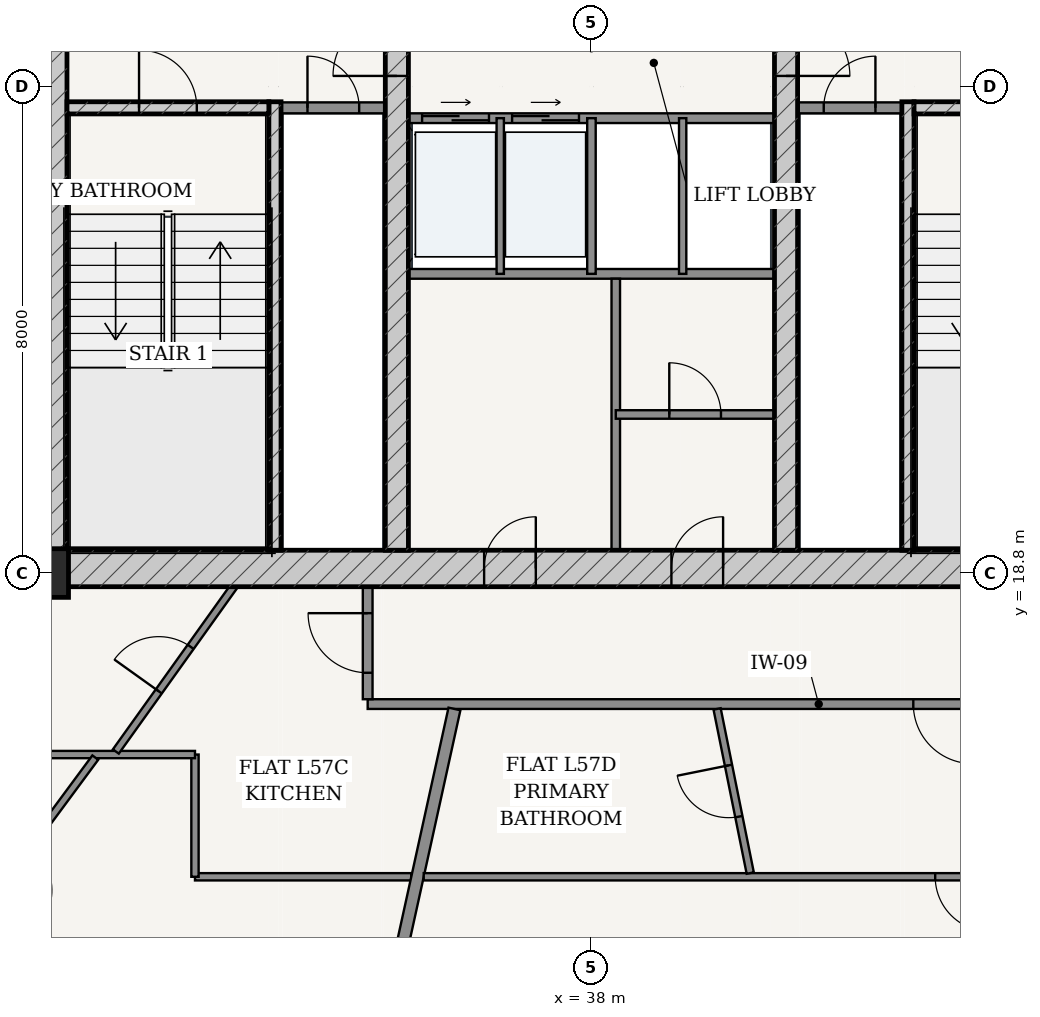
"""IFC4 building model, lengths in metres.
Left out: names, types, materials, properties, quantities, classifications, styles, units other than length and angle.
Written with IfcOpenShell. Run it as: python <this file> out.ifc"""

import sys

from ifc_helpers import new_model, si_unit, direction, frame, frame_2d, origin, origin_2d, place, context, subcontext, project, spatial, rectangle, extrude, source, transform, mapped, element, fill, save


model = new_model("IFC4")
c1 = context("Model", 3, precision=1e-05, world=origin(), true_north=direction((-0.2419218956, 0.970295726276)))
c2 = subcontext(c1, "Body", "Model", "MODEL_VIEW")
j1 = project(units=[si_unit("LENGTHUNIT", "METRE"), si_unit("PLANEANGLEUNIT", "RADIAN")], contexts=[c1])
p1 = place(None, origin())
s1 = spatial("IfcSite", under=j1, at=p1, CompositionType="ELEMENT")
p2 = place(p1, origin())
s2 = spatial("IfcBuilding", under=s1, at=p2, CompositionType="ELEMENT")
p3 = place(p2, frame((0.0, 0.0, 217.1)))
s3 = spatial("IfcBuildingStorey", under=s2, at=p3, CompositionType="ELEMENT", Elevation=217.1)
p4 = place(p3, frame((29.0, 18.8, 0.0), z_axis=(0.0, 0.0, 1.0), x_axis=(1.0, 0.0, 0.0)))
e1 = element("IfcColumn", 1, at=p4, inside=s3, PredefinedType="COLUMN", context=c2, shape_type="SweptSolid", body=[
    extrude(rectangle(XDim=0.8, YDim=0.8, at=origin_2d()), origin(), (0.0, 0.0, 1.0), 3.7),
])
p5 = place(p3, frame((28.775, 18.875, 0.0), z_axis=(0.0, 0.0, 1.0), x_axis=(1.0, 0.0, 0.0)))
e2 = element("IfcWall", 2, at=p5, inside=s3, PredefinedType="SHEAR", context=c2, shape_type="SweptSolid", body=[
    extrude(rectangle(XDim=18.45, YDim=0.6, at=frame_2d((9.225, 0.0))), origin(), (0.0, 0.0, 1.0), 3.435),
])
p6 = place(p5, frame((7.46, 0.0, 0.0)))
e3 = element("IfcOpeningElement", 3, at=p6, cuts=e2, PredefinedType="OPENING", context=c2, shape_type="SweptSolid", body=[
    extrude(rectangle(XDim=0.85, YDim=2.1, at=frame_2d((0.425, 1.05))), frame((0.0, 0.31, 0.0), z_axis=(0.0, -1.0, 0.0), x_axis=(1.0, 0.0, 0.0)), (0.0, 0.0, 1.0), 0.62),
])
p7 = place(p5, frame((10.54, 0.0, 0.0)))
e4 = element("IfcOpeningElement", 4, at=p7, cuts=e2, PredefinedType="OPENING", context=c2, shape_type="SweptSolid", body=[
    extrude(rectangle(XDim=0.85, YDim=2.1, at=frame_2d((0.425, 1.05))), frame((0.0, 0.31, 0.0), z_axis=(0.0, -1.0, 0.0), x_axis=(1.0, 0.0, 0.0)), (0.0, 0.0, 1.0), 0.62),
])
p8 = place(p3, frame((29.075, 19.175, 0.0), z_axis=(0.0, 0.0, 1.0), x_axis=(0.0, 1.0, 0.0)))
e5 = element("IfcWall", 5, at=p8, inside=s3, PredefinedType="SHEAR", context=c2, shape_type="SweptSolid", body=[
    extrude(rectangle(XDim=15.25, YDim=0.6, at=frame_2d((7.625, 0.0))), origin(), (0.0, 0.0, 1.0), 3.435),
])
p9 = place(p8, frame((9.875, 0.0, 0.0)))
e6 = element("IfcOpeningElement", 6, at=p9, cuts=e5, PredefinedType="OPENING", context=c2, shape_type="SweptSolid", body=[
    extrude(rectangle(XDim=1.5, YDim=2.2, at=frame_2d((0.75, 1.1))), frame((0.0, 0.31, 0.0), z_axis=(0.0, -1.0, 0.0), x_axis=(1.0, 0.0, 0.0)), (0.0, 0.0, 1.0), 0.62),
])
p10 = place(p3, frame((32.795, 19.175, 0.0), z_axis=(0.0, 0.0, 1.0), x_axis=(0.0, 1.0, 0.0)))
e7 = element("IfcWall", 7, at=p10, inside=s3, PredefinedType="SOLIDWALL", context=c2, shape_type="SweptSolid", body=[
    extrude(rectangle(XDim=7.375, YDim=0.2, at=frame_2d((3.688, 0.0))), origin(), (0.0, 0.0, 1.0), 3.435),
])
p11 = place(p3, frame((29.375, 26.45, 0.0), z_axis=(0.0, 0.0, 1.0), x_axis=(1.0, 0.0, 0.0)))
e8 = element("IfcWall", 8, at=p11, inside=s3, PredefinedType="SOLIDWALL", context=c2, shape_type="SweptSolid", body=[
    extrude(rectangle(XDim=3.32, YDim=0.2, at=frame_2d((1.66, 0.0))), origin(), (0.0, 0.0, 1.0), 3.435),
])
p12 = place(p11, frame((1.185, 0.0, 0.0)))
e9 = element("IfcOpeningElement", 9, at=p12, cuts=e8, PredefinedType="OPENING", context=c2, shape_type="SweptSolid", body=[
    extrude(rectangle(XDim=0.95, YDim=2.15, at=frame_2d((0.475, 1.075))), frame((0.0, 0.11, 0.0), z_axis=(0.0, -1.0, 0.0), x_axis=(1.0, 0.0, 0.0)), (0.0, 0.0, 1.0), 0.22),
])
p13 = place(p3, frame((43.205, 19.175, 0.0), z_axis=(0.0, 0.0, 1.0), x_axis=(0.0, 1.0, 0.0)))
e10 = element("IfcWall", 10, at=p13, inside=s3, PredefinedType="SOLIDWALL", context=c2, shape_type="SweptSolid", body=[
    extrude(rectangle(XDim=7.375, YDim=0.2, at=frame_2d((3.688, 0.0))), origin(), (0.0, 0.0, 1.0), 3.435),
])
p14 = place(p3, frame((43.305, 26.45, 0.0), z_axis=(0.0, 0.0, 1.0), x_axis=(1.0, 0.0, 0.0)))
e11 = element("IfcWall", 11, at=p14, inside=s3, PredefinedType="SOLIDWALL", context=c2, shape_type="SweptSolid", body=[
    extrude(rectangle(XDim=3.32, YDim=0.2, at=frame_2d((1.66, 0.0))), origin(), (0.0, 0.0, 1.0), 3.435),
])
p15 = place(p14, frame((1.185, 0.0, 0.0)))
e12 = element("IfcOpeningElement", 12, at=p15, cuts=e11, PredefinedType="OPENING", context=c2, shape_type="SweptSolid", body=[
    extrude(rectangle(XDim=0.95, YDim=2.15, at=frame_2d((0.475, 1.075))), frame((0.0, 0.11, 0.0), z_axis=(0.0, -1.0, 0.0), x_axis=(1.0, 0.0, 0.0)), (0.0, 0.0, 1.0), 0.22),
])
p16 = place(p3, frame((34.8, 19.175, 0.0), z_axis=(0.0, 0.0, 1.0), x_axis=(0.0, 1.0, 0.0)))
e13 = element("IfcWall", 13, at=p16, inside=s3, PredefinedType="SHEAR", context=c2, shape_type="SweptSolid", body=[
    extrude(rectangle(XDim=15.25, YDim=0.38, at=frame_2d((7.625, 0.0))), origin(), (0.0, 0.0, 1.0), 3.435),
])
p17 = place(p16, frame((7.8, 0.0, 0.0)))
e14 = element("IfcOpeningElement", 14, at=p17, cuts=e13, PredefinedType="OPENING", context=c2, shape_type="SweptSolid", body=[
    extrude(rectangle(XDim=1.05, YDim=2.15, at=frame_2d((0.525, 1.075))), frame((0.0, 0.2, 0.0), z_axis=(0.0, -1.0, 0.0), x_axis=(1.0, 0.0, 0.0)), (0.0, 0.0, 1.0), 0.4),
])
p18 = place(p3, frame((41.2, 19.175, 0.0), z_axis=(0.0, 0.0, 1.0), x_axis=(0.0, 1.0, 0.0)))
e15 = element("IfcWall", 15, at=p18, inside=s3, PredefinedType="SHEAR", context=c2, shape_type="SweptSolid", body=[
    extrude(rectangle(XDim=15.25, YDim=0.38, at=frame_2d((7.625, 0.0))), origin(), (0.0, 0.0, 1.0), 3.435),
])
p19 = place(p18, frame((7.8, 0.0, 0.0)))
e16 = element("IfcOpeningElement", 16, at=p19, cuts=e15, PredefinedType="OPENING", context=c2, shape_type="SweptSolid", body=[
    extrude(rectangle(XDim=1.05, YDim=2.15, at=frame_2d((0.525, 1.075))), frame((0.0, 0.2, 0.0), z_axis=(0.0, -1.0, 0.0), x_axis=(1.0, 0.0, 0.0)), (0.0, 0.0, 1.0), 0.4),
])
p20 = place(p3, frame((32.9, 26.45, 0.0), z_axis=(0.0, 0.0, 1.0), x_axis=(1.0, 0.0, 0.0)))
e17 = element("IfcWall", 17, at=p20, inside=s3, PredefinedType="PARTITIONING", context=c2, shape_type="SweptSolid", body=[
    extrude(rectangle(XDim=1.71, YDim=0.18, at=frame_2d((0.855, 0.0))), origin(), (0.0, 0.0, 1.0), 3.435),
])
p21 = place(p20, frame((0.43, 0.0, 0.0)))
e18 = element("IfcOpeningElement", 18, at=p21, cuts=e17, PredefinedType="OPENING", context=c2, shape_type="SweptSolid", body=[
    extrude(rectangle(XDim=0.85, YDim=2.1, at=frame_2d((0.425, 1.05))), frame((0.0, 0.1, 0.0), z_axis=(0.0, -1.0, 0.0), x_axis=(1.0, 0.0, 0.0)), (0.0, 0.0, 1.0), 0.2),
])
p22 = place(p3, frame((41.39, 26.45, 0.0), z_axis=(0.0, 0.0, 1.0), x_axis=(1.0, 0.0, 0.0)))
e19 = element("IfcWall", 19, at=p22, inside=s3, PredefinedType="PARTITIONING", context=c2, shape_type="SweptSolid", body=[
    extrude(rectangle(XDim=1.71, YDim=0.18, at=frame_2d((0.855, 0.0))), origin(), (0.0, 0.0, 1.0), 3.435),
])
p23 = place(p22, frame((0.43, 0.0, 0.0)))
e20 = element("IfcOpeningElement", 20, at=p23, cuts=e19, PredefinedType="OPENING", context=c2, shape_type="SweptSolid", body=[
    extrude(rectangle(XDim=0.85, YDim=2.1, at=frame_2d((0.425, 1.05))), frame((0.0, 0.1, 0.0), z_axis=(0.0, -1.0, 0.0), x_axis=(1.0, 0.0, 0.0)), (0.0, 0.0, 1.0), 0.2),
])
p24 = place(p3, frame((34.99, 26.28, 0.0), z_axis=(0.0, 0.0, 1.0), x_axis=(1.0, 0.0, 0.0)))
e21 = element("IfcWall", 21, at=p24, inside=s3, PredefinedType="PARTITIONING", context=c2, shape_type="SweptSolid", body=[
    extrude(rectangle(XDim=6.02, YDim=0.16, at=frame_2d((3.01, 0.0))), origin(), (0.0, 0.0, 1.0), 3.435),
])
p25 = place(p24, frame((0.225, 0.0, 0.0)))
e22 = element("IfcOpeningElement", 22, at=p25, cuts=e21, PredefinedType="OPENING", context=c2, shape_type="SweptSolid", body=[
    extrude(rectangle(XDim=1.1, YDim=2.2, at=frame_2d((0.55, 1.1))), frame((0.0, 0.09, 0.0), z_axis=(0.0, -1.0, 0.0), x_axis=(1.0, 0.0, 0.0)), (0.0, 0.0, 1.0), 0.18),
])
p26 = place(p24, frame((1.705, 0.0, 0.0)))
e23 = element("IfcOpeningElement", 23, at=p26, cuts=e21, PredefinedType="OPENING", context=c2, shape_type="SweptSolid", body=[
    extrude(rectangle(XDim=1.1, YDim=2.2, at=frame_2d((0.55, 1.1))), frame((0.0, 0.09, 0.0), z_axis=(0.0, -1.0, 0.0), x_axis=(1.0, 0.0, 0.0)), (0.0, 0.0, 1.0), 0.18),
])
p27 = place(p3, frame((34.99, 23.72, 0.0), z_axis=(0.0, 0.0, 1.0), x_axis=(1.0, 0.0, 0.0)))
e24 = element("IfcWall", 24, at=p27, inside=s3, PredefinedType="PARTITIONING", context=c2, shape_type="SweptSolid", body=[
    extrude(rectangle(XDim=6.02, YDim=0.16, at=frame_2d((3.01, 0.0))), origin(), (0.0, 0.0, 1.0), 3.435),
])
p28 = place(p3, frame((36.5, 23.72, 0.0), z_axis=(0.0, 0.0, 1.0), x_axis=(0.0, 1.0, 0.0)))
e25 = element("IfcWall", 25, at=p28, inside=s3, PredefinedType="PARTITIONING", context=c2, shape_type="SweptSolid", body=[
    extrude(rectangle(XDim=2.56, YDim=0.12, at=frame_2d((1.28, 0.0))), origin(), (0.0, 0.0, 1.0), 3.435),
])
p29 = place(p3, frame((38.0, 23.72, 0.0), z_axis=(0.0, 0.0, 1.0), x_axis=(0.0, 1.0, 0.0)))
e26 = element("IfcWall", 26, at=p29, inside=s3, PredefinedType="PARTITIONING", context=c2, shape_type="SweptSolid", body=[
    extrude(rectangle(XDim=2.56, YDim=0.14, at=frame_2d((1.28, 0.0))), origin(), (0.0, 0.0, 1.0), 3.435),
])
p30 = place(p3, frame((39.5, 23.72, 0.0), z_axis=(0.0, 0.0, 1.0), x_axis=(0.0, 1.0, 0.0)))
e27 = element("IfcWall", 27, at=p30, inside=s3, PredefinedType="PARTITIONING", context=c2, shape_type="SweptSolid", body=[
    extrude(rectangle(XDim=2.56, YDim=0.12, at=frame_2d((1.28, 0.0))), origin(), (0.0, 0.0, 1.0), 3.435),
])
p31 = place(p3, frame((38.4, 19.175, 0.0), z_axis=(0.0, 0.0, 1.0), x_axis=(0.0, 1.0, 0.0)))
e28 = element("IfcWall", 28, at=p31, inside=s3, PredefinedType="PARTITIONING", context=c2, shape_type="SweptSolid", body=[
    extrude(rectangle(XDim=4.465, YDim=0.14, at=frame_2d((2.232, 0.0))), origin(), (0.0, 0.0, 1.0), 3.435),
])
p32 = place(p3, frame((38.4, 21.407, 0.0), z_axis=(0.0, 0.0, 1.0), x_axis=(1.0, 0.0, 0.0)))
e29 = element("IfcWall", 29, at=p32, inside=s3, PredefinedType="PARTITIONING", context=c2, shape_type="SweptSolid", body=[
    extrude(rectangle(XDim=2.61, YDim=0.14, at=frame_2d((1.305, 0.0))), origin(), (0.0, 0.0, 1.0), 3.435),
])
p33 = place(p32, frame((0.88, 0.0, 0.0)))
e30 = element("IfcOpeningElement", 30, at=p33, cuts=e29, PredefinedType="OPENING", context=c2, shape_type="SweptSolid", body=[
    extrude(rectangle(XDim=0.85, YDim=2.1, at=frame_2d((0.425, 1.05))), frame((0.0, 0.08, 0.0), z_axis=(0.0, -1.0, 0.0), x_axis=(1.0, 0.0, 0.0)), (0.0, 0.0, 1.0), 0.16),
])
p34 = place(p3, frame((34.32, 16.645, 0.0), z_axis=(0.0, 0.0, 1.0), x_axis=(1.0, 0.0, 0.0)))
e31 = element("IfcWall", 31, at=p34, inside=s3, PredefinedType="PARTITIONING", context=c2, shape_type="SweptSolid", body=[
    extrude(rectangle(XDim=14.835, YDim=0.16, at=frame_2d((7.417, 0.0))), origin(), (0.0, 0.0, 1.0), 2.951),
])
p35 = place(p34, frame((8.973, 0.0, 0.0)))
e32 = element("IfcOpeningElement", 32, at=p35, cuts=e31, PredefinedType="OPENING", context=c2, shape_type="SweptSolid", body=[
    extrude(rectangle(XDim=0.98, YDim=2.2, at=frame_2d((0.49, 1.1))), frame((0.0, 0.09, 0.0), z_axis=(0.0, -1.0, 0.0), x_axis=(1.0, 0.0, 0.0)), (0.0, 0.0, 1.0), 0.18),
])
p36 = place(p3, frame((34.32, 16.725, 0.0), z_axis=(0.0, 0.0, 1.0), x_axis=(0.0, 1.0, 0.0)))
e33 = element("IfcWall", 33, at=p36, inside=s3, PredefinedType="PARTITIONING", context=c2, shape_type="SweptSolid", body=[
    extrude(rectangle(XDim=1.85, YDim=0.16, at=frame_2d((0.925, 0.0))), origin(), (0.0, 0.0, 1.0), 3.435),
])
p37 = place(p36, frame((0.435, 0.0, 0.0)))
e34 = element("IfcOpeningElement", 34, at=p37, cuts=e33, PredefinedType="OPENING", context=c2, shape_type="SweptSolid", body=[
    extrude(rectangle(XDim=0.98, YDim=2.2, at=frame_2d((0.49, 1.1))), frame((0.0, 0.09, 0.0), z_axis=(0.0, -1.0, 0.0), x_axis=(1.0, 0.0, 0.0)), (0.0, 0.0, 1.0), 0.18),
])
p38 = place(p3, frame((35.038, 13.805, 0.0), z_axis=(0.0, 0.0, 1.0), x_axis=(-1.0, 0.0, 0.0)))
e35 = element("IfcWall", 35, at=p38, inside=s3, PredefinedType="PARTITIONING", context=c2, shape_type="SweptSolid", body=[
    extrude(rectangle(XDim=3.558, YDim=0.12, at=frame_2d((1.779, 0.0))), origin(), (0.0, 0.0, 1.0), 2.951),
])
p39 = place(p3, frame((31.48, 13.805, 0.0), z_axis=(0.0, 0.0, 1.0), x_axis=(0.0, 1.0, 0.0)))
e36 = element("IfcWall", 36, at=p39, inside=s3, PredefinedType="PARTITIONING", context=c2, shape_type="SweptSolid", body=[
    extrude(rectangle(XDim=2.01, YDim=0.12, at=frame_2d((1.005, 0.0))), origin(), (0.0, 0.0, 1.0), 3.11),
])
p40 = place(p3, frame((31.48, 15.815, 0.0), z_axis=(0.0, 0.0, 1.0), x_axis=(-1.0, 0.0, 0.0)))
e37 = element("IfcWall", 37, at=p40, inside=s3, PredefinedType="PARTITIONING", context=c2, shape_type="SweptSolid", body=[
    extrude(rectangle(XDim=5.465, YDim=0.12, at=frame_2d((2.732, 0.0))), origin(), (0.0, 0.0, 1.0), 2.951),
])
p41 = place(p3, frame((29.841, 15.765, 0.0), z_axis=(0.0, 0.0, 1.0), x_axis=(-0.594535821787, -0.804069124275, 0.0)))
e38 = element("IfcWall", 38, at=p41, inside=s3, PredefinedType="PARTITIONING", context=c2, shape_type="SweptSolid", body=[
    extrude(rectangle(XDim=6.543, YDim=0.12, at=frame_2d((3.272, 0.0))), origin(), (0.0, 0.0, 1.0), 2.951),
])
p42 = place(p41, frame((1.814, 0.0, 0.0)))
e39 = element("IfcOpeningElement", 39, at=p42, cuts=e38, PredefinedType="OPENING", context=c2, shape_type="SweptSolid", body=[
    extrude(rectangle(XDim=0.9, YDim=2.15, at=frame_2d((0.45, 1.075))), frame((0.0, 0.07, 0.0), z_axis=(0.0, -1.0, 0.0), x_axis=(1.0, 0.0, 0.0)), (0.0, 0.0, 1.0), 0.14),
])
p43 = place(p3, frame((32.117, 18.575, 0.0), z_axis=(0.0, 0.0, 1.0), x_axis=(-0.581813438478, -0.813322274874, 0.0)))
e40 = element("IfcWall", 40, at=p43, inside=s3, PredefinedType="PARTITIONING", context=c2, shape_type="SweptSolid", body=[
    extrude(rectangle(XDim=3.331, YDim=0.12, at=frame_2d((1.666, 0.0))), origin(), (0.0, 0.0, 1.0), 3.435),
])
p44 = place(p43, frame((1.216, 0.0, 0.0)))
e41 = element("IfcOpeningElement", 41, at=p44, cuts=e40, PredefinedType="OPENING", context=c2, shape_type="SweptSolid", body=[
    extrude(rectangle(XDim=0.9, YDim=2.15, at=frame_2d((0.45, 1.075))), frame((0.0, 0.07, 0.0), z_axis=(0.0, -1.0, 0.0), x_axis=(1.0, 0.0, 0.0)), (0.0, 0.0, 1.0), 0.14),
])
p45 = place(p3, frame((35.747, 16.565, 0.0), z_axis=(0.0, 0.0, 1.0), x_axis=(-0.214957946814, -0.976623305631, 0.0)))
e42 = element("IfcWall", 42, at=p45, inside=s3, PredefinedType="PARTITIONING", context=c2, shape_type="SweptSolid", body=[
    extrude(rectangle(XDim=9.202, YDim=0.2, at=frame_2d((4.601, 0.0))), origin(), (0.0, 0.0, 1.0), 2.951),
])
p46 = place(p3, frame((51.995, 13.805, 0.0), z_axis=(0.0, 0.0, 1.0), x_axis=(-1.0, 0.0, 0.0)))
e43 = element("IfcWall", 43, at=p46, inside=s3, PredefinedType="PARTITIONING", context=c2, shape_type="SweptSolid", body=[
    extrude(rectangle(XDim=16.753, YDim=0.12, at=frame_2d((8.377, 0.0))), origin(), (0.0, 0.0, 1.0), 2.951),
])
p47 = place(p46, frame((7.442, 0.0, 0.0)))
e44 = element("IfcOpeningElement", 44, at=p47, cuts=e43, PredefinedType="OPENING", context=c2, shape_type="SweptSolid", body=[
    extrude(rectangle(XDim=0.9, YDim=2.15, at=frame_2d((0.45, 1.075))), frame((0.0, 0.07, 0.0), z_axis=(0.0, -1.0, 0.0), x_axis=(1.0, 0.0, 0.0)), (0.0, 0.0, 1.0), 0.14),
])
p48 = place(p3, frame((40.066, 16.565, 0.0), z_axis=(0.0, 0.0, 1.0), x_axis=(0.197974199315, -0.980207231358, 0.0)))
e45 = element("IfcWall", 45, at=p48, inside=s3, PredefinedType="PARTITIONING", context=c2, shape_type="SweptSolid", body=[
    extrude(rectangle(XDim=2.754, YDim=0.12, at=frame_2d((1.377, 0.0))), origin(), (0.0, 0.0, 1.0), 3.11),
])
p49 = place(p48, frame((0.947, 0.0, 0.0)))
e46 = element("IfcOpeningElement", 46, at=p49, cuts=e45, PredefinedType="OPENING", context=c2, shape_type="SweptSolid", body=[
    extrude(rectangle(XDim=0.86, YDim=2.15, at=frame_2d((0.43, 1.075))), frame((0.0, 0.07, 0.0), z_axis=(0.0, -1.0, 0.0), x_axis=(1.0, 0.0, 0.0)), (0.0, 0.0, 1.0), 0.14),
])
m1 = source(origin(), c2, "Body", "SweptSolid", [
    extrude(rectangle(XDim=1.05, YDim=2.15, at=frame_2d((0.525, 1.075))), frame((0.0, 0.025, 0.0), z_axis=(0.0, -1.0, 0.0), x_axis=(1.0, 0.0, 0.0)), (0.0, 0.0, 1.0), 0.05),
])
p50 = place(p17, origin())
e47 = element("IfcDoor", 47, at=p50, inside=s3, OperationType="SINGLE_SWING_LEFT", PredefinedType="DOOR", context=c2, shape_type="MappedRepresentation", body=[
    mapped(m1, transform((0.0, 0.0, 0.0), scale=1.0)),
])
fill(e14, e47)
p51 = place(p19, frame((1.05, 0.0, 0.0), z_axis=(0.0, 0.0, 1.0), x_axis=(-1.0, 0.0, 0.0)))
e48 = element("IfcDoor", 48, at=p51, inside=s3, OperationType="SINGLE_SWING_RIGHT", PredefinedType="DOOR", context=c2, shape_type="MappedRepresentation", body=[
    mapped(m1, transform((0.0, 0.0, 0.0), scale=1.0)),
])
fill(e16, e48)
m2 = source(origin(), c2, "Body", "SweptSolid", [
    extrude(rectangle(XDim=0.95, YDim=2.15, at=frame_2d((0.475, 1.075))), frame((0.0, 0.025, 0.0), z_axis=(0.0, -1.0, 0.0), x_axis=(1.0, 0.0, 0.0)), (0.0, 0.0, 1.0), 0.05),
])
p52 = place(p12, origin())
e49 = element("IfcDoor", 49, at=p52, inside=s3, OperationType="SINGLE_SWING_LEFT", PredefinedType="DOOR", context=c2, shape_type="MappedRepresentation", body=[
    mapped(m2, transform((0.0, 0.0, 0.0), scale=1.0)),
])
fill(e9, e49)
m3 = source(origin(), c2, "Body", "SweptSolid", [
    extrude(rectangle(XDim=0.85, YDim=2.1, at=frame_2d((0.425, 1.05))), frame((0.0, 0.025, 0.0), z_axis=(0.0, -1.0, 0.0), x_axis=(1.0, 0.0, 0.0)), (0.0, 0.0, 1.0), 0.05),
])
p53 = place(p21, origin())
e50 = element("IfcDoor", 50, at=p53, inside=s3, OperationType="SINGLE_SWING_LEFT", PredefinedType="DOOR", context=c2, shape_type="MappedRepresentation", body=[
    mapped(m3, transform((0.0, 0.0, 0.0), scale=1.0)),
])
fill(e18, e50)
p54 = place(p23, origin())
e51 = element("IfcDoor", 51, at=p54, inside=s3, OperationType="SINGLE_SWING_RIGHT", PredefinedType="DOOR", context=c2, shape_type="MappedRepresentation", body=[
    mapped(m3, transform((0.0, 0.0, 0.0), scale=1.0)),
])
fill(e20, e51)
p55 = place(p6, origin())
e52 = element("IfcDoor", 52, at=p55, inside=s3, OperationType="SINGLE_SWING_RIGHT", PredefinedType="DOOR", context=c2, shape_type="MappedRepresentation", body=[
    mapped(m3, transform((0.0, 0.0, 0.0), scale=1.0)),
])
fill(e3, e52)
p56 = place(p7, origin())
e53 = element("IfcDoor", 53, at=p56, inside=s3, OperationType="SINGLE_SWING_RIGHT", PredefinedType="DOOR", context=c2, shape_type="MappedRepresentation", body=[
    mapped(m3, transform((0.0, 0.0, 0.0), scale=1.0)),
])
fill(e4, e53)
p57 = place(p33, origin())
e54 = element("IfcDoor", 54, at=p57, inside=s3, OperationType="SINGLE_SWING_LEFT", PredefinedType="DOOR", context=c2, shape_type="MappedRepresentation", body=[
    mapped(m3, transform((0.0, 0.0, 0.0), scale=1.0)),
])
fill(e30, e54)
m4 = source(origin(), c2, "Body", "SweptSolid", [
    extrude(rectangle(XDim=1.1, YDim=2.2, at=frame_2d((0.55, 1.1))), frame((0.0, 0.025, 0.0), z_axis=(0.0, -1.0, 0.0), x_axis=(1.0, 0.0, 0.0)), (0.0, 0.0, 1.0), 0.05),
])
p58 = place(p25, origin())
e55 = element("IfcDoor", 55, at=p58, inside=s3, OperationType="DOUBLE_DOOR_SLIDING", PredefinedType="DOOR", context=c2, shape_type="MappedRepresentation", body=[
    mapped(m4, transform((0.0, 0.0, 0.0), scale=1.0)),
])
fill(e22, e55)
p59 = place(p26, origin())
e56 = element("IfcDoor", 56, at=p59, inside=s3, OperationType="DOUBLE_DOOR_SLIDING", PredefinedType="DOOR", context=c2, shape_type="MappedRepresentation", body=[
    mapped(m4, transform((0.0, 0.0, 0.0), scale=1.0)),
])
fill(e23, e56)
m5 = source(origin(), c2, "Body", "SweptSolid", [
    extrude(rectangle(XDim=0.98, YDim=2.2, at=frame_2d((0.49, 1.1))), frame((0.0, 0.025, 0.0), z_axis=(0.0, -1.0, 0.0), x_axis=(1.0, 0.0, 0.0)), (0.0, 0.0, 1.0), 0.05),
])
p60 = place(p37, origin())
e57 = element("IfcDoor", 57, at=p60, inside=s3, OperationType="SINGLE_SWING_RIGHT", PredefinedType="DOOR", context=c2, shape_type="MappedRepresentation", body=[
    mapped(m5, transform((0.0, 0.0, 0.0), scale=1.0)),
])
fill(e34, e57)
m6 = source(origin(), c2, "Body", "SweptSolid", [
    extrude(rectangle(XDim=0.9, YDim=2.15, at=frame_2d((0.45, 1.075))), frame((0.0, 0.025, 0.0), z_axis=(0.0, -1.0, 0.0), x_axis=(1.0, 0.0, 0.0)), (0.0, 0.0, 1.0), 0.05),
])
p61 = place(p44, frame((0.9, 0.0, 0.0), z_axis=(0.0, 0.0, 1.0), x_axis=(-1.0, 0.0, 0.0)))
e58 = element("IfcDoor", 58, at=p61, inside=s3, OperationType="SINGLE_SWING_LEFT", PredefinedType="DOOR", context=c2, shape_type="MappedRepresentation", body=[
    mapped(m6, transform((0.0, 0.0, 0.0), scale=1.0)),
])
fill(e41, e58)
p62 = place(p35, frame((0.98, 0.0, 0.0), z_axis=(0.0, 0.0, 1.0), x_axis=(-1.0, 0.0, 0.0)))
e59 = element("IfcDoor", 59, at=p62, inside=s3, OperationType="SINGLE_SWING_LEFT", PredefinedType="DOOR", context=c2, shape_type="MappedRepresentation", body=[
    mapped(m5, transform((0.0, 0.0, 0.0), scale=1.0)),
])
fill(e32, e59)
m7 = source(origin(), c2, "Body", "SweptSolid", [
    extrude(rectangle(XDim=0.86, YDim=2.15, at=frame_2d((0.43, 1.075))), frame((0.0, 0.025, 0.0), z_axis=(0.0, -1.0, 0.0), x_axis=(1.0, 0.0, 0.0)), (0.0, 0.0, 1.0), 0.05),
])
p63 = place(p49, frame((0.86, 0.0, 0.0), z_axis=(0.0, 0.0, 1.0), x_axis=(-1.0, 0.0, 0.0)))
e60 = element("IfcDoor", 60, at=p63, inside=s3, OperationType="SINGLE_SWING_RIGHT", PredefinedType="DOOR", context=c2, shape_type="MappedRepresentation", body=[
    mapped(m7, transform((0.0, 0.0, 0.0), scale=1.0)),
])
fill(e46, e60)
p64 = place(p47, origin())
e61 = element("IfcDoor", 61, at=p64, inside=s3, OperationType="SINGLE_SWING_LEFT", PredefinedType="DOOR", context=c2, shape_type="MappedRepresentation", body=[
    mapped(m6, transform((0.0, 0.0, 0.0), scale=1.0)),
])
fill(e44, e61)
save(model, sys.argv[1])
